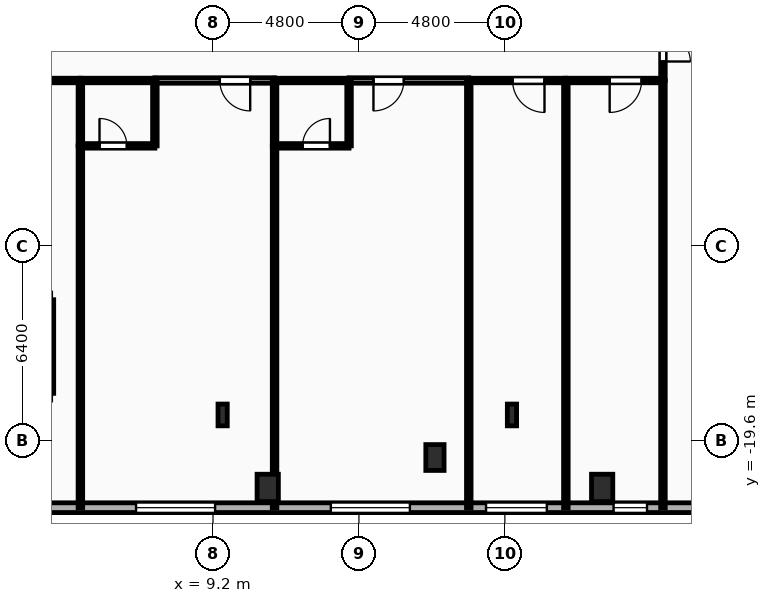
"""IFC4 building model, lengths in metres.
Left out: names, types, materials, properties, quantities, classifications, styles, units other than length and angle.
Written with IfcOpenShell. Run it as: python <this file> out.ifc"""

import sys

from ifc_helpers import new_model, si_unit, direction, frame, frame_2d, origin, origin_2d, place, context, subcontext, project, spatial, rectangle, i_section, extrude, element, fill, save


model = new_model("IFC4")
c1 = context("Model", 3, precision=1e-05, world=origin(), true_north=direction((0.0, 1.0)))
c2 = subcontext(c1, "Body", "Model", "MODEL_VIEW")
j1 = project(units=[si_unit("LENGTHUNIT", "METRE"), si_unit("PLANEANGLEUNIT", "RADIAN")], contexts=[c1])
p1 = place(None, origin())
s1 = spatial("IfcSite", under=j1, at=p1, CompositionType="ELEMENT")
p2 = place(p1, origin())
s2 = spatial("IfcBuilding", under=s1, at=p2, CompositionType="ELEMENT")
p3 = place(p2, frame((0.0, 0.0, 18.0)))
s3 = spatial("IfcBuildingStorey", under=s2, at=p3, CompositionType="ELEMENT", Elevation=18.0)
for number, where, z_axis, x_axis in (
    (1, (11.0, -21.15, 0.0), (0.0, 0.0, 1.0), (1.0, 0.0, 0.0)),
    (2, (22.0, -21.15, 0.0), (0.0, 0.0, 1.0), (1.0, 0.0, 0.0)),
):
    element("IfcColumn", number, at=place(p3, frame(where, z_axis=z_axis, x_axis=x_axis)), inside=s3, PredefinedType="COLUMN", context=c2, shape_type="SweptSolid", body=[
        extrude(rectangle(XDim=0.7, YDim=0.9, at=origin_2d()), origin(), (0.0, 0.0, 1.0), 4.5),
    ])
p4 = place(p3, frame((16.5, -20.15, 0.0), z_axis=(0.0, 0.0, 1.0), x_axis=(1.0, 0.0, 0.0)))
e3 = element("IfcColumn", 3, at=p4, inside=s3, PredefinedType="PILASTER", context=c2, shape_type="SweptSolid", body=[
    extrude(rectangle(XDim=0.6, YDim=0.85, at=origin_2d()), origin(), (0.0, 0.0, 1.0), 4.5),
])
for number, where, z_axis, x_axis in (
    (4, (9.517, -18.75, 0.0), (0.0, 0.0, 1.0), (1.0, 0.0, 0.0)),
    (5, (19.033, -18.75, 0.0), (0.0, 0.0, 1.0), (1.0, 0.0, 0.0)),
):
    element("IfcColumn", number, at=place(p3, frame(where, z_axis=z_axis, x_axis=x_axis)), inside=s3, PredefinedType="COLUMN", context=c2, shape_type="SweptSolid", body=[
        extrude(i_section(OverallWidth=0.304, OverallDepth=0.716, WebThickness=0.021, FlangeThickness=0.04, FilletRadius=0.027, at=origin_2d()), origin(), (0.0, 0.0, 1.0), 4.5),
    ])
p5 = place(p3, frame((36.8, -21.8, 0.0), z_axis=(0.0, 0.0, 1.0), x_axis=(-1.0, 0.0, 0.0)))
e6 = element("IfcWall", 6, at=p5, inside=s3, PredefinedType="SOLIDWALL", context=c2, shape_type="SweptSolid", body=[
    extrude(rectangle(XDim=73.6, YDim=0.32, at=frame_2d((36.8, 0.0))), origin(), (0.0, 0.0, 1.0), 4.17),
])
p6 = place(p5, frame((1.079, 0.0, 0.85)))
e7 = element("IfcOpeningElement", 7, at=p6, cuts=e6, PredefinedType="OPENING", context=c2, shape_type="SweptSolid", body=[
    extrude(rectangle(XDim=2.3, YDim=2.4, at=frame_2d((1.15, 1.2))), frame((0.0, 0.17, 0.0), z_axis=(0.0, -1.0, 0.0), x_axis=(1.0, 0.0, 0.0)), (0.0, 0.0, 1.0), 0.34),
])
p7 = place(p5, frame((8.431, 0.0, 0.85)))
e8 = element("IfcOpeningElement", 8, at=p7, cuts=e6, PredefinedType="OPENING", context=c2, shape_type="SweptSolid", body=[
    extrude(rectangle(XDim=2.6, YDim=2.4, at=frame_2d((1.3, 1.2))), frame((0.0, 0.17, 0.0), z_axis=(0.0, -1.0, 0.0), x_axis=(1.0, 0.0, 0.0)), (0.0, 0.0, 1.0), 0.34),
])
p8 = place(p5, frame((13.324, 0.0, 0.85)))
e9 = element("IfcOpeningElement", 9, at=p8, cuts=e6, PredefinedType="OPENING", context=c2, shape_type="SweptSolid", body=[
    extrude(rectangle(XDim=1.1, YDim=1.85, at=frame_2d((0.55, 0.925))), frame((0.0, 0.17, 0.0), z_axis=(0.0, -1.0, 0.0), x_axis=(1.0, 0.0, 0.0)), (0.0, 0.0, 1.0), 0.34),
])
p9 = place(p5, frame((16.619, 0.0, 0.85)))
e10 = element("IfcOpeningElement", 10, at=p9, cuts=e6, PredefinedType="OPENING", context=c2, shape_type="SweptSolid", body=[
    extrude(rectangle(XDim=2.0, YDim=2.4, at=frame_2d((1.0, 1.2))), frame((0.0, 0.17, 0.0), z_axis=(0.0, -1.0, 0.0), x_axis=(1.0, 0.0, 0.0)), (0.0, 0.0, 1.0), 0.34),
])
p10 = place(p5, frame((21.125, 0.0, 0.85)))
e11 = element("IfcOpeningElement", 11, at=p10, cuts=e6, PredefinedType="OPENING", context=c2, shape_type="SweptSolid", body=[
    extrude(rectangle(XDim=2.6, YDim=2.4, at=frame_2d((1.3, 1.2))), frame((0.0, 0.17, 0.0), z_axis=(0.0, -1.0, 0.0), x_axis=(1.0, 0.0, 0.0)), (0.0, 0.0, 1.0), 0.34),
])
p11 = place(p5, frame((27.531, 0.0, 0.85)))
e12 = element("IfcOpeningElement", 12, at=p11, cuts=e6, PredefinedType="OPENING", context=c2, shape_type="SweptSolid", body=[
    extrude(rectangle(XDim=2.6, YDim=2.4, at=frame_2d((1.3, 1.2))), frame((0.0, 0.17, 0.0), z_axis=(0.0, -1.0, 0.0), x_axis=(1.0, 0.0, 0.0)), (0.0, 0.0, 1.0), 0.34),
])
p12 = place(p5, frame((33.474, 0.0, 0.85)))
e13 = element("IfcOpeningElement", 13, at=p12, cuts=e6, PredefinedType="OPENING", context=c2, shape_type="SweptSolid", body=[
    extrude(rectangle(XDim=2.6, YDim=2.4, at=frame_2d((1.3, 1.2))), frame((0.0, 0.17, 0.0), z_axis=(0.0, -1.0, 0.0), x_axis=(1.0, 0.0, 0.0)), (0.0, 0.0, 1.0), 0.34),
])
p13 = place(p5, frame((41.427, 0.0, 0.85)))
e14 = element("IfcOpeningElement", 14, at=p13, cuts=e6, PredefinedType="OPENING", context=c2, shape_type="SweptSolid", body=[
    extrude(rectangle(XDim=2.6, YDim=2.4, at=frame_2d((1.3, 1.2))), frame((0.0, 0.17, 0.0), z_axis=(0.0, -1.0, 0.0), x_axis=(1.0, 0.0, 0.0)), (0.0, 0.0, 1.0), 0.34),
])
p14 = place(p5, frame((48.177, 0.0, 0.85)))
e15 = element("IfcOpeningElement", 15, at=p14, cuts=e6, PredefinedType="OPENING", context=c2, shape_type="SweptSolid", body=[
    extrude(rectangle(XDim=2.0, YDim=2.4, at=frame_2d((1.0, 1.2))), frame((0.0, 0.17, 0.0), z_axis=(0.0, -1.0, 0.0), x_axis=(1.0, 0.0, 0.0)), (0.0, 0.0, 1.0), 0.34),
])
p15 = place(p5, frame((51.798, 0.0, 0.85)))
e16 = element("IfcOpeningElement", 16, at=p15, cuts=e6, PredefinedType="OPENING", context=c2, shape_type="SweptSolid", body=[
    extrude(rectangle(XDim=2.6, YDim=2.4, at=frame_2d((1.3, 1.2))), frame((0.0, 0.17, 0.0), z_axis=(0.0, -1.0, 0.0), x_axis=(1.0, 0.0, 0.0)), (0.0, 0.0, 1.0), 0.34),
])
p16 = place(p5, frame((56.111, 0.0, 0.85)))
e17 = element("IfcOpeningElement", 17, at=p16, cuts=e6, PredefinedType="OPENING", context=c2, shape_type="SweptSolid", body=[
    extrude(rectangle(XDim=2.3, YDim=2.4, at=frame_2d((1.15, 1.2))), frame((0.0, 0.17, 0.0), z_axis=(0.0, -1.0, 0.0), x_axis=(1.0, 0.0, 0.0)), (0.0, 0.0, 1.0), 0.34),
])
p17 = place(p5, frame((62.649, 0.0, 0.85)))
e18 = element("IfcOpeningElement", 18, at=p17, cuts=e6, PredefinedType="OPENING", context=c2, shape_type="SweptSolid", body=[
    extrude(rectangle(XDim=2.6, YDim=2.4, at=frame_2d((1.3, 1.2))), frame((0.0, 0.17, 0.0), z_axis=(0.0, -1.0, 0.0), x_axis=(1.0, 0.0, 0.0)), (0.0, 0.0, 1.0), 0.34),
])
p18 = place(p5, frame((70.301, 0.0, 0.85)))
e19 = element("IfcOpeningElement", 19, at=p18, cuts=e6, PredefinedType="OPENING", context=c2, shape_type="SweptSolid", body=[
    extrude(rectangle(XDim=2.3, YDim=2.4, at=frame_2d((1.15, 1.2))), frame((0.0, 0.17, 0.0), z_axis=(0.0, -1.0, 0.0), x_axis=(1.0, 0.0, 0.0)), (0.0, 0.0, 1.0), 0.34),
])
p19 = place(p3, frame((3.86, -18.04, 0.0), z_axis=(0.0, 0.0, 1.0), x_axis=(0.0, 1.0, 0.0)))
e20 = element("IfcWall", 20, at=p19, inside=s3, PredefinedType="SHEAR", context=c2, shape_type="SweptSolid", body=[
    extrude(rectangle(XDim=3.08, YDim=0.2, at=frame_2d((1.54, 0.0))), origin(), (0.0, 0.0, 1.0), 4.17),
])
p20 = place(p3, frame((24.0, -5.6, 0.0), z_axis=(0.0, 0.0, 1.0), x_axis=(0.0, -1.0, 0.0)))
e21 = element("IfcWall", 21, at=p20, inside=s3, PredefinedType="PARTITIONING", context=c2, shape_type="SweptSolid", body=[
    extrude(rectangle(XDim=2.15, YDim=0.15, at=frame_2d((1.075, 0.0))), origin(), (0.0, 0.0, 1.0), 4.17),
])
p21 = place(p20, frame((0.625, 0.0, 0.0)))
e22 = element("IfcOpeningElement", 22, at=p21, cuts=e21, PredefinedType="OPENING", context=c2, shape_type="SweptSolid", body=[
    extrude(rectangle(XDim=0.9, YDim=2.1, at=frame_2d((0.45, 1.05))), frame((0.0, 0.085, 0.0), z_axis=(0.0, -1.0, 0.0), x_axis=(1.0, 0.0, 0.0)), (0.0, 0.0, 1.0), 0.17),
])
p22 = place(p3, frame((4.838, -7.75, 0.0), z_axis=(0.0, 0.0, 1.0), x_axis=(-1.0, 0.0, 0.0)))
e23 = element("IfcWall", 23, at=p22, inside=s3, PredefinedType="PARTITIONING", context=c2, shape_type="SweptSolid", body=[
    extrude(rectangle(XDim=4.838, YDim=0.15, at=frame_2d((2.419, 0.0))), origin(), (0.0, 0.0, 1.0), 4.17),
])
p23 = place(p3, frame((11.225, -7.75, 0.0), z_axis=(0.0, 0.0, 1.0), x_axis=(-1.0, 0.0, 0.0)))
e24 = element("IfcWall", 24, at=p23, inside=s3, PredefinedType="PARTITIONING", context=c2, shape_type="SweptSolid", body=[
    extrude(rectangle(XDim=3.937, YDim=0.18, at=frame_2d((1.969, 0.0))), origin(), (0.0, 0.0, 1.0), 4.17),
])
p24 = place(p23, frame((0.802, 0.0, 0.0)))
e25 = element("IfcOpeningElement", 25, at=p24, cuts=e24, PredefinedType="OPENING", context=c2, shape_type="SweptSolid", body=[
    extrude(rectangle(XDim=1.0, YDim=2.15, at=frame_2d((0.5, 1.075))), frame((0.0, 0.1, 0.0), z_axis=(0.0, -1.0, 0.0), x_axis=(1.0, 0.0, 0.0)), (0.0, 0.0, 1.0), 0.2),
])
p25 = place(p3, frame((7.288, -7.75, 0.0), z_axis=(0.0, 0.0, 1.0), x_axis=(-1.0, 0.0, 0.0)))
e26 = element("IfcWall", 26, at=p25, inside=s3, PredefinedType="PLUMBINGWALL", context=c2, shape_type="SweptSolid", body=[
    extrude(rectangle(XDim=2.45, YDim=0.15, at=frame_2d((1.225, 0.0))), origin(), (0.0, 0.0, 1.0), 4.17),
])
p26 = place(p3, frame((17.613, -7.75, 0.0), z_axis=(0.0, 0.0, 1.0), x_axis=(-1.0, 0.0, 0.0)))
e27 = element("IfcWall", 27, at=p26, inside=s3, PredefinedType="PARTITIONING", context=c2, shape_type="SweptSolid", body=[
    extrude(rectangle(XDim=3.938, YDim=0.18, at=frame_2d((1.969, 0.0))), origin(), (0.0, 0.0, 1.0), 4.17),
])
p27 = place(p26, frame((2.136, 0.0, 0.0)))
e28 = element("IfcOpeningElement", 28, at=p27, cuts=e27, PredefinedType="OPENING", context=c2, shape_type="SweptSolid", body=[
    extrude(rectangle(XDim=1.0, YDim=2.15, at=frame_2d((0.5, 1.075))), frame((0.0, 0.1, 0.0), z_axis=(0.0, -1.0, 0.0), x_axis=(1.0, 0.0, 0.0)), (0.0, 0.0, 1.0), 0.2),
])
p28 = place(p3, frame((13.675, -7.75, 0.0), z_axis=(0.0, 0.0, 1.0), x_axis=(-1.0, 0.0, 0.0)))
e29 = element("IfcWall", 29, at=p28, inside=s3, PredefinedType="PLUMBINGWALL", context=c2, shape_type="SweptSolid", body=[
    extrude(rectangle(XDim=2.45, YDim=0.15, at=frame_2d((1.225, 0.0))), origin(), (0.0, 0.0, 1.0), 4.17),
])
p29 = place(p3, frame((20.806, -7.75, 0.0), z_axis=(0.0, 0.0, 1.0), x_axis=(-1.0, 0.0, 0.0)))
e30 = element("IfcWall", 30, at=p29, inside=s3, PredefinedType="PARTITIONING", context=c2, shape_type="SweptSolid", body=[
    extrude(rectangle(XDim=3.193, YDim=0.15, at=frame_2d((1.597, 0.0))), origin(), (0.0, 0.0, 1.0), 4.17),
])
p30 = place(p29, frame((0.703, 0.0, 0.0)))
e31 = element("IfcOpeningElement", 31, at=p30, cuts=e30, PredefinedType="OPENING", context=c2, shape_type="SweptSolid", body=[
    extrude(rectangle(XDim=1.05, YDim=2.15, at=frame_2d((0.525, 1.075))), frame((0.0, 0.085, 0.0), z_axis=(0.0, -1.0, 0.0), x_axis=(1.0, 0.0, 0.0)), (0.0, 0.0, 1.0), 0.17),
])
p31 = place(p3, frame((24.0, -7.75, 0.0), z_axis=(0.0, 0.0, 1.0), x_axis=(-1.0, 0.0, 0.0)))
e32 = element("IfcWall", 32, at=p31, inside=s3, PredefinedType="PARTITIONING", context=c2, shape_type="SweptSolid", body=[
    extrude(rectangle(XDim=3.194, YDim=0.15, at=frame_2d((1.597, 0.0))), origin(), (0.0, 0.0, 1.0), 4.17),
])
p32 = place(p31, frame((0.703, 0.0, 0.0)))
e33 = element("IfcOpeningElement", 33, at=p32, cuts=e32, PredefinedType="OPENING", context=c2, shape_type="SweptSolid", body=[
    extrude(rectangle(XDim=1.05, YDim=2.15, at=frame_2d((0.525, 1.075))), frame((0.0, 0.085, 0.0), z_axis=(0.0, -1.0, 0.0), x_axis=(1.0, 0.0, 0.0)), (0.0, 0.0, 1.0), 0.17),
])
p33 = place(p3, frame((24.0, -21.8, 0.0), z_axis=(0.0, 0.0, 1.0), x_axis=(0.0, 1.0, 0.0)))
e34 = element("IfcWall", 34, at=p33, inside=s3, PredefinedType="PARTITIONING", context=c2, shape_type="SweptSolid", body=[
    extrude(rectangle(XDim=14.05, YDim=0.15, at=frame_2d((7.025, 0.0))), origin(), (0.0, 0.0, 1.0), 4.17),
])
p34 = place(p3, frame((4.838, -9.9, 0.0), z_axis=(0.0, 0.0, 1.0), x_axis=(0.0, -1.0, 0.0)))
e35 = element("IfcWall", 35, at=p34, inside=s3, PredefinedType="PARTITIONING", context=c2, shape_type="SweptSolid", body=[
    extrude(rectangle(XDim=11.9, YDim=0.15, at=frame_2d((5.95, 0.0))), origin(), (0.0, 0.0, 1.0), 4.17),
])
p35 = place(p3, frame((4.838, -7.75, 0.0), z_axis=(0.0, 0.0, 1.0), x_axis=(0.0, -1.0, 0.0)))
e36 = element("IfcWall", 36, at=p35, inside=s3, PredefinedType="PLUMBINGWALL", context=c2, shape_type="SweptSolid", body=[
    extrude(rectangle(XDim=2.15, YDim=0.15, at=frame_2d((1.075, 0.0))), origin(), (0.0, 0.0, 1.0), 4.17),
])
p36 = place(p3, frame((4.838, -9.9, 0.0), z_axis=(0.0, 0.0, 1.0), x_axis=(1.0, 0.0, 0.0)))
e37 = element("IfcWall", 37, at=p36, inside=s3, PredefinedType="PLUMBINGWALL", context=c2, shape_type="SweptSolid", body=[
    extrude(rectangle(XDim=2.45, YDim=0.15, at=frame_2d((1.225, 0.0))), origin(), (0.0, 0.0, 1.0), 4.17),
])
p37 = place(p36, frame((0.629, 0.0, 0.0)))
e38 = element("IfcOpeningElement", 38, at=p37, cuts=e37, PredefinedType="OPENING", context=c2, shape_type="SweptSolid", body=[
    extrude(rectangle(XDim=0.9, YDim=2.1, at=frame_2d((0.45, 1.05))), frame((0.0, 0.085, 0.0), z_axis=(0.0, -1.0, 0.0), x_axis=(1.0, 0.0, 0.0)), (0.0, 0.0, 1.0), 0.17),
])
p38 = place(p3, frame((7.288, -9.9, 0.0), z_axis=(0.0, 0.0, 1.0), x_axis=(0.0, 1.0, 0.0)))
e39 = element("IfcWall", 39, at=p38, inside=s3, PredefinedType="PLUMBINGWALL", context=c2, shape_type="SweptSolid", body=[
    extrude(rectangle(XDim=2.15, YDim=0.15, at=frame_2d((1.075, 0.0))), origin(), (0.0, 0.0, 1.0), 4.17),
])
p39 = place(p3, frame((11.225, -9.9, 0.0), z_axis=(0.0, 0.0, 1.0), x_axis=(0.0, -1.0, 0.0)))
e40 = element("IfcWall", 40, at=p39, inside=s3, PredefinedType="PARTITIONING", context=c2, shape_type="SweptSolid", body=[
    extrude(rectangle(XDim=11.9, YDim=0.15, at=frame_2d((5.95, 0.0))), origin(), (0.0, 0.0, 1.0), 4.17),
])
p40 = place(p3, frame((11.225, -7.75, 0.0), z_axis=(0.0, 0.0, 1.0), x_axis=(0.0, -1.0, 0.0)))
e41 = element("IfcWall", 41, at=p40, inside=s3, PredefinedType="PLUMBINGWALL", context=c2, shape_type="SweptSolid", body=[
    extrude(rectangle(XDim=2.15, YDim=0.15, at=frame_2d((1.075, 0.0))), origin(), (0.0, 0.0, 1.0), 4.17),
])
p41 = place(p3, frame((11.225, -9.9, 0.0), z_axis=(0.0, 0.0, 1.0), x_axis=(1.0, 0.0, 0.0)))
e42 = element("IfcWall", 42, at=p41, inside=s3, PredefinedType="PLUMBINGWALL", context=c2, shape_type="SweptSolid", body=[
    extrude(rectangle(XDim=2.45, YDim=0.15, at=frame_2d((1.225, 0.0))), origin(), (0.0, 0.0, 1.0), 4.17),
])
p42 = place(p41, frame((0.921, 0.0, 0.0)))
e43 = element("IfcOpeningElement", 43, at=p42, cuts=e42, PredefinedType="OPENING", context=c2, shape_type="SweptSolid", body=[
    extrude(rectangle(XDim=0.9, YDim=2.1, at=frame_2d((0.45, 1.05))), frame((0.0, 0.085, 0.0), z_axis=(0.0, -1.0, 0.0), x_axis=(1.0, 0.0, 0.0)), (0.0, 0.0, 1.0), 0.17),
])
p43 = place(p3, frame((13.675, -9.9, 0.0), z_axis=(0.0, 0.0, 1.0), x_axis=(0.0, 1.0, 0.0)))
e44 = element("IfcWall", 44, at=p43, inside=s3, PredefinedType="PLUMBINGWALL", context=c2, shape_type="SweptSolid", body=[
    extrude(rectangle(XDim=2.15, YDim=0.15, at=frame_2d((1.075, 0.0))), origin(), (0.0, 0.0, 1.0), 4.17),
])
for number, where, z_axis, x_axis in (
    (45, (17.613, -7.75, 0.0), (0.0, 0.0, 1.0), (0.0, -1.0, 0.0)),
    (46, (20.806, -7.75, 0.0), (0.0, 0.0, 1.0), (0.0, -1.0, 0.0)),
):
    element("IfcWall", number, at=place(p3, frame(where, z_axis=z_axis, x_axis=x_axis)), inside=s3, PredefinedType="PARTITIONING", context=c2, shape_type="SweptSolid", body=[
        extrude(rectangle(XDim=14.05, YDim=0.15, at=frame_2d((7.025, 0.0))), origin(), (0.0, 0.0, 1.0), 4.17),
    ])
p44 = place(p8, origin())
e47 = element("IfcWindow", 47, at=p44, inside=s3, PartitioningType="SINGLE_PANEL", PredefinedType="WINDOW", context=c2, shape_type="SweptSolid", body=[
    extrude(rectangle(XDim=1.1, YDim=1.85, at=frame_2d((0.55, 0.925))), frame((0.0, 0.03, 0.0), z_axis=(0.0, -1.0, 0.0), x_axis=(1.0, 0.0, 0.0)), (0.0, 0.0, 1.0), 0.06),
])
fill(e9, e47)
p45 = place(p9, origin())
e48 = element("IfcWindow", 48, at=p45, inside=s3, PartitioningType="SINGLE_PANEL", PredefinedType="WINDOW", context=c2, shape_type="SweptSolid", body=[
    extrude(rectangle(XDim=2.0, YDim=2.4, at=frame_2d((1.0, 1.2))), frame((0.0, 0.03, 0.0), z_axis=(0.0, -1.0, 0.0), x_axis=(1.0, 0.0, 0.0)), (0.0, 0.0, 1.0), 0.06),
])
fill(e10, e48)
p46 = place(p10, origin())
e49 = element("IfcWindow", 49, at=p46, inside=s3, PartitioningType="SINGLE_PANEL", PredefinedType="WINDOW", context=c2, shape_type="SweptSolid", body=[
    extrude(rectangle(XDim=2.6, YDim=2.4, at=frame_2d((1.3, 1.2))), frame((0.0, 0.03, 0.0), z_axis=(0.0, -1.0, 0.0), x_axis=(1.0, 0.0, 0.0)), (0.0, 0.0, 1.0), 0.06),
])
fill(e11, e49)
p47 = place(p11, origin())
e50 = element("IfcWindow", 50, at=p47, inside=s3, PartitioningType="SINGLE_PANEL", PredefinedType="WINDOW", context=c2, shape_type="SweptSolid", body=[
    extrude(rectangle(XDim=2.6, YDim=2.4, at=frame_2d((1.3, 1.2))), frame((0.0, 0.03, 0.0), z_axis=(0.0, -1.0, 0.0), x_axis=(1.0, 0.0, 0.0)), (0.0, 0.0, 1.0), 0.06),
])
fill(e12, e50)
p48 = place(p21, origin())
e51 = element("IfcDoor", 51, at=p48, inside=s3, OperationType="SINGLE_SWING_RIGHT", PredefinedType="DOOR", context=c2, shape_type="SweptSolid", body=[
    extrude(rectangle(XDim=0.9, YDim=2.1, at=frame_2d((0.45, 1.05))), frame((0.0, 0.025, 0.0), z_axis=(0.0, -1.0, 0.0), x_axis=(1.0, 0.0, 0.0)), (0.0, 0.0, 1.0), 0.05),
])
fill(e22, e51)
p49 = place(p24, origin())
e52 = element("IfcDoor", 52, at=p49, inside=s3, OperationType="SINGLE_SWING_LEFT", PredefinedType="DOOR", context=c2, shape_type="SweptSolid", body=[
    extrude(rectangle(XDim=1.0, YDim=2.15, at=frame_2d((0.5, 1.075))), frame((0.0, 0.025, 0.0), z_axis=(0.0, -1.0, 0.0), x_axis=(1.0, 0.0, 0.0)), (0.0, 0.0, 1.0), 0.05),
])
fill(e25, e52)
p50 = place(p27, origin())
e53 = element("IfcDoor", 53, at=p50, inside=s3, OperationType="SINGLE_SWING_RIGHT", PredefinedType="DOOR", context=c2, shape_type="SweptSolid", body=[
    extrude(rectangle(XDim=1.0, YDim=2.15, at=frame_2d((0.5, 1.075))), frame((0.0, 0.025, 0.0), z_axis=(0.0, -1.0, 0.0), x_axis=(1.0, 0.0, 0.0)), (0.0, 0.0, 1.0), 0.05),
])
fill(e28, e53)
p51 = place(p30, origin())
e54 = element("IfcDoor", 54, at=p51, inside=s3, OperationType="SINGLE_SWING_LEFT", PredefinedType="DOOR", context=c2, shape_type="SweptSolid", body=[
    extrude(rectangle(XDim=1.05, YDim=2.15, at=frame_2d((0.525, 1.075))), frame((0.0, 0.025, 0.0), z_axis=(0.0, -1.0, 0.0), x_axis=(1.0, 0.0, 0.0)), (0.0, 0.0, 1.0), 0.05),
])
fill(e31, e54)
p52 = place(p32, origin())
e55 = element("IfcDoor", 55, at=p52, inside=s3, OperationType="SINGLE_SWING_RIGHT", PredefinedType="DOOR", context=c2, shape_type="SweptSolid", body=[
    extrude(rectangle(XDim=1.05, YDim=2.15, at=frame_2d((0.525, 1.075))), frame((0.0, 0.025, 0.0), z_axis=(0.0, -1.0, 0.0), x_axis=(1.0, 0.0, 0.0)), (0.0, 0.0, 1.0), 0.05),
])
fill(e33, e55)
p53 = place(p37, origin())
e56 = element("IfcDoor", 56, at=p53, inside=s3, OperationType="SINGLE_SWING_LEFT", PredefinedType="DOOR", context=c2, shape_type="SweptSolid", body=[
    extrude(rectangle(XDim=0.9, YDim=2.1, at=frame_2d((0.45, 1.05))), frame((0.0, 0.025, 0.0), z_axis=(0.0, -1.0, 0.0), x_axis=(1.0, 0.0, 0.0)), (0.0, 0.0, 1.0), 0.05),
])
fill(e38, e56)
p54 = place(p42, origin())
e57 = element("IfcDoor", 57, at=p54, inside=s3, OperationType="SINGLE_SWING_RIGHT", PredefinedType="DOOR", context=c2, shape_type="SweptSolid", body=[
    extrude(rectangle(XDim=0.9, YDim=2.1, at=frame_2d((0.45, 1.05))), frame((0.0, 0.025, 0.0), z_axis=(0.0, -1.0, 0.0), x_axis=(1.0, 0.0, 0.0)), (0.0, 0.0, 1.0), 0.05),
])
fill(e43, e57)
save(model, sys.argv[1])
